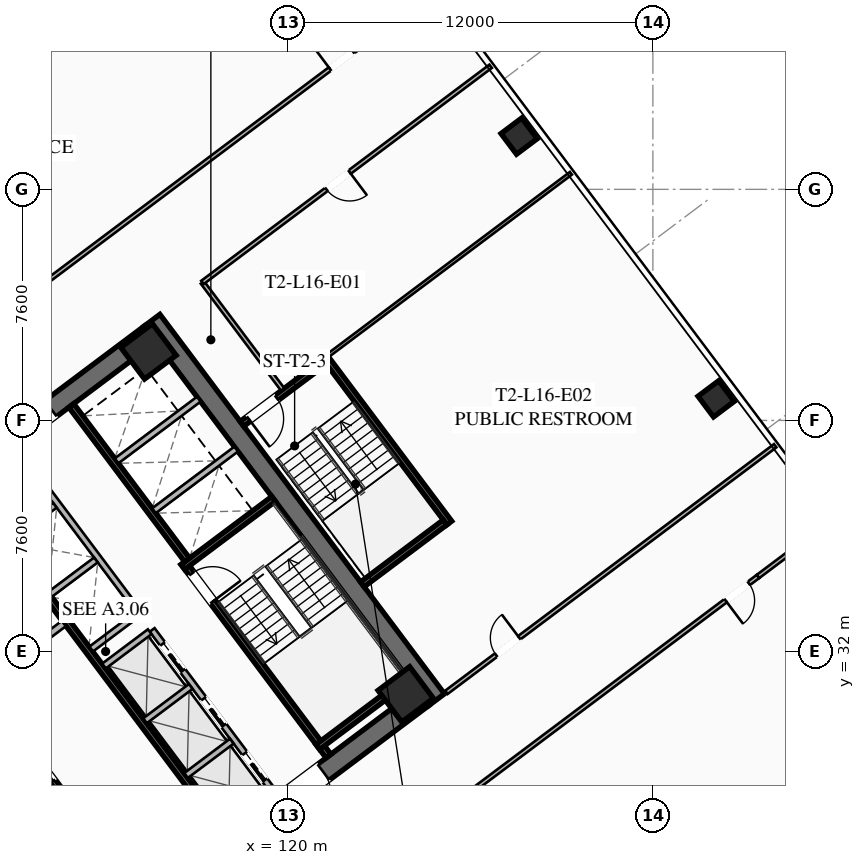
"""IFC4 building model, lengths in metres.
Left out: names, types, materials, properties, quantities, classifications, styles, units other than length and angle.
Written with IfcOpenShell. Run it as: python <this file> out.ifc"""

import sys

from ifc_helpers import new_model, si_unit, direction, frame, frame_2d, origin, origin_2d, place, context, subcontext, project, spatial, rectangle, hollow_rectangle, extrude, element, fill, save


model = new_model("IFC4")
c1 = context("Model", 3, precision=1e-05, world=origin(), true_north=direction((0.0, 1.0)))
c2 = subcontext(c1, "Body", "Model", "MODEL_VIEW")
j1 = project(units=[si_unit("LENGTHUNIT", "METRE"), si_unit("PLANEANGLEUNIT", "RADIAN")], contexts=[c1])
p1 = place(None, origin())
s1 = spatial("IfcSite", under=j1, at=p1, CompositionType="ELEMENT")
p2 = place(p1, origin())
s2 = spatial("IfcBuilding", under=s1, at=p2, CompositionType="ELEMENT")
p3 = place(p2, frame((0.0, 0.0, 63.65)))
s3 = spatial("IfcBuildingStorey", under=s2, at=p3, CompositionType="ELEMENT", Elevation=63.65)
for number, where, z_axis, x_axis in (
    (1, (112.476, 21.107, 0.0), (0.0, 0.0, 1.0), (-0.6, 0.8, 0.0)),
    (2, (115.524, 42.893, 0.0), (0.0, 0.0, 1.0), (0.6, -0.8, 0.0)),
):
    element("IfcWall", number, at=place(p3, frame(where, z_axis=z_axis, x_axis=x_axis)), inside=s3, PredefinedType="SHEAR", context=c2, shape_type="SweptSolid", body=[
        extrude(rectangle(XDim=15.6, YDim=0.65, at=frame_2d((7.8, 0.0))), origin(), (0.0, 0.0, 1.0), 3.55),
    ])
p4 = place(p3, frame((124.429, 30.478, 0.0), z_axis=(0.0, 0.0, 1.0), x_axis=(-0.799998028465, -0.600002628705, 0.0)))
e3 = element("IfcWall", 3, at=p4, inside=s3, PredefinedType="SHEAR", context=c2, shape_type="SweptSolid", body=[
    extrude(rectangle(XDim=14.86, YDim=0.65, at=frame_2d((7.43, 0.0))), origin(), (0.0, 0.0, 1.0), 3.55),
])
p5 = place(p4, frame((9.13, 0.0, 0.0)))
e4 = element("IfcOpeningElement", 4, at=p5, cuts=e3, PredefinedType="OPENING", context=c2, shape_type="SweptSolid", body=[
    extrude(rectangle(XDim=1.25, YDim=2.25, at=frame_2d((0.625, 1.125))), frame((0.0, 0.335, 0.0), z_axis=(0.0, -1.0, 0.0), x_axis=(1.0, 0.0, 0.0)), (0.0, 0.0, 1.0), 0.67),
])
p6 = place(p4, frame((4.08, 0.0, 0.0)))
e5 = element("IfcOpeningElement", 5, at=p6, cuts=e3, PredefinedType="OPENING", context=c2, shape_type="SweptSolid", body=[
    extrude(rectangle(XDim=1.25, YDim=2.25, at=frame_2d((0.625, 1.125))), frame((0.0, 0.335, 0.0), z_axis=(0.0, -1.0, 0.0), x_axis=(1.0, 0.0, 0.0)), (0.0, 0.0, 1.0), 0.67),
])
p7 = place(p3, frame((103.571, 33.522, 0.0), z_axis=(0.0, 0.0, 1.0), x_axis=(0.799998028465, 0.600002628705, 0.0)))
e6 = element("IfcWall", 6, at=p7, inside=s3, PredefinedType="SHEAR", context=c2, shape_type="SweptSolid", body=[
    extrude(rectangle(XDim=14.86, YDim=0.65, at=frame_2d((7.43, 0.0))), origin(), (0.0, 0.0, 1.0), 3.55),
])
p8 = place(p7, frame((4.48, 0.0, 0.0)))
e7 = element("IfcOpeningElement", 7, at=p8, cuts=e6, PredefinedType="OPENING", context=c2, shape_type="SweptSolid", body=[
    extrude(rectangle(XDim=1.25, YDim=2.25, at=frame_2d((0.625, 1.125))), frame((0.0, 0.335, 0.0), z_axis=(0.0, -1.0, 0.0), x_axis=(1.0, 0.0, 0.0)), (0.0, 0.0, 1.0), 0.67),
])
p9 = place(p7, frame((9.53, 0.0, 0.0)))
e8 = element("IfcOpeningElement", 8, at=p9, cuts=e6, PredefinedType="OPENING", context=c2, shape_type="SweptSolid", body=[
    extrude(rectangle(XDim=1.25, YDim=2.25, at=frame_2d((0.625, 1.125))), frame((0.0, 0.335, 0.0), z_axis=(0.0, -1.0, 0.0), x_axis=(1.0, 0.0, 0.0)), (0.0, 0.0, 1.0), 0.67),
])
for number, where, z_axis, x_axis in (
    (9, (123.87, 30.59, 0.0), (0.0, 0.0, 1.0), (0.8, 0.6, 0.0)),
    (10, (115.41, 41.87, 0.0), (0.0, 0.0, 1.0), (0.8, 0.6, 0.0)),
):
    element("IfcColumn", number, at=place(p3, frame(where, z_axis=z_axis, x_axis=x_axis)), inside=s3, PredefinedType="COLUMN", context=c2, shape_type="SweptSolid", body=[
        extrude(hollow_rectangle(XDim=1.3, YDim=1.3, WallThickness=0.05, at=origin_2d()), origin(), (0.0, 0.0, 1.0), 3.35),
    ])
for number, where, z_axis, x_axis in (
    (11, (134.08, 40.31, 0.0), (0.0, 0.0, 1.0), (0.8, 0.6, 0.0)),
    (12, (127.6, 48.95, 0.0), (0.0, 0.0, 1.0), (0.8, 0.6, 0.0)),
):
    element("IfcColumn", number, at=place(p3, frame(where, z_axis=z_axis, x_axis=x_axis)), inside=s3, PredefinedType="COLUMN", context=c2, shape_type="SweptSolid", body=[
        extrude(hollow_rectangle(XDim=0.85, YDim=0.85, WallThickness=0.035, at=origin_2d()), origin(), (0.0, 0.0, 1.0), 3.35),
    ])
p10 = place(p3, frame((116.56, 34.92, 0.0), z_axis=(0.0, 0.0, 1.0), x_axis=(0.600009827119, -0.799992629566, 0.0)))
e13 = element("IfcWall", 13, at=p10, inside=s3, PredefinedType="SHEAR", context=c2, shape_type="SweptSolid", body=[
    extrude(rectangle(XDim=7.95, YDim=0.2, at=frame_2d((3.975, 0.0))), origin(), (0.0, 0.0, 1.0), 3.35),
])
p11 = place(p10, frame((0.45, 0.0, 0.0)))
e14 = element("IfcOpeningElement", 14, at=p11, cuts=e13, PredefinedType="OPENING", context=c2, shape_type="SweptSolid", body=[
    extrude(rectangle(XDim=1.15, YDim=2.2, at=frame_2d((0.575, 1.1))), frame((0.0, 0.11, 0.0), z_axis=(0.0, -1.0, 0.0), x_axis=(1.0, 0.0, 0.0)), (0.0, 0.0, 1.0), 0.22),
])
for number, where, z_axis, x_axis in (
    (15, (116.54, 34.78, 0.0), (0.0, 0.0, 1.0), (0.8, 0.6, 0.0)),
    (16, (120.98, 28.86, 0.0), (0.0, 0.0, 1.0), (0.8, 0.6, 0.0)),
):
    element("IfcWall", number, at=place(p3, frame(where, z_axis=z_axis, x_axis=x_axis)), inside=s3, PredefinedType="SHEAR", context=c2, shape_type="SweptSolid", body=[
        extrude(rectangle(XDim=3.73, YDim=0.2, at=frame_2d((1.865, 0.0))), origin(), (0.0, 0.0, 1.0), 3.35),
    ])
p12 = place(p3, frame((117.938, 26.016, 0.0), z_axis=(0.0, 0.0, 1.0), x_axis=(-0.600005463273, 0.799995902516, 0.0)))
e17 = element("IfcWall", 17, at=p12, inside=s3, PredefinedType="SHEAR", context=c2, shape_type="SweptSolid", body=[
    extrude(rectangle(XDim=14.3, YDim=0.2, at=frame_2d((7.15, 0.0))), origin(), (0.0, 0.0, 1.0), 3.35),
])
p13 = place(p3, frame((110.104, 31.028, 0.0), z_axis=(0.0, 0.0, 1.0), x_axis=(0.800018601094, 0.59997519774, 0.0)))
e18 = element("IfcWall", 18, at=p13, inside=s3, PredefinedType="SOLIDWALL", context=c2, shape_type="SweptSolid", body=[
    extrude(rectangle(XDim=3.15, YDim=0.22, at=frame_2d((1.575, 0.0))), origin(), (0.0, 0.0, 1.0), 2.493),
])
p14 = place(p3, frame((115.13, 23.91, 0.0), z_axis=(0.0, 0.0, 1.0), x_axis=(-0.599975393228, 0.800018454488, 0.0)))
e19 = element("IfcWall", 19, at=p14, inside=s3, PredefinedType="SHEAR", context=c2, shape_type="SweptSolid", body=[
    extrude(rectangle(XDim=6.35, YDim=0.2, at=frame_2d((3.175, 0.0))), origin(), (0.0, 0.0, 1.0), 3.35),
])
p15 = place(p14, frame((4.775, 0.0, 0.0)))
e20 = element("IfcOpeningElement", 20, at=p15, cuts=e19, PredefinedType="OPENING", context=c2, shape_type="SweptSolid", body=[
    extrude(rectangle(XDim=1.3, YDim=2.25, at=frame_2d((0.65, 1.125))), frame((0.0, 0.11, 0.0), z_axis=(0.0, -1.0, 0.0), x_axis=(1.0, 0.0, 0.0)), (0.0, 0.0, 1.0), 0.22),
])
p16 = place(p14, frame((2.775, 0.0, 0.0)))
e21 = element("IfcOpeningElement", 21, at=p16, cuts=e19, PredefinedType="OPENING", context=c2, shape_type="SweptSolid", body=[
    extrude(rectangle(XDim=1.3, YDim=2.25, at=frame_2d((0.65, 1.125))), frame((0.0, 0.11, 0.0), z_axis=(0.0, -1.0, 0.0), x_axis=(1.0, 0.0, 0.0)), (0.0, 0.0, 1.0), 0.22),
])
p17 = place(p14, frame((0.575, 0.0, 0.0)))
e22 = element("IfcOpeningElement", 22, at=p17, cuts=e19, PredefinedType="OPENING", context=c2, shape_type="SweptSolid", body=[
    extrude(rectangle(XDim=1.3, YDim=2.25, at=frame_2d((0.65, 1.125))), frame((0.0, 0.11, 0.0), z_axis=(0.0, -1.0, 0.0), x_axis=(1.0, 0.0, 0.0)), (0.0, 0.0, 1.0), 0.22),
])
p18 = place(p3, frame((112.87, 40.09, 0.0), z_axis=(0.0, 0.0, 1.0), x_axis=(0.599975393228, -0.800018454488, 0.0)))
e23 = element("IfcWall", 23, at=p18, inside=s3, PredefinedType="SHEAR", context=c2, shape_type="SweptSolid", body=[
    extrude(rectangle(XDim=6.35, YDim=0.2, at=frame_2d((3.175, 0.0))), origin(), (0.0, 0.0, 1.0), 3.35),
])
for number, where, z_axis, x_axis in (
    (24, (115.59, 36.63, 0.0), (0.0, 0.0, 1.0), (0.8, 0.6, 0.0)),
    (25, (114.36, 38.27, 0.0), (0.0, 0.0, 1.0), (0.8, 0.6, 0.0)),
):
    element("IfcWall", number, at=place(p3, frame(where, z_axis=z_axis, x_axis=x_axis)), inside=s3, PredefinedType="SOLIDWALL", context=c2, shape_type="SweptSolid", body=[
        extrude(rectangle(XDim=3.38, YDim=0.2, at=frame_2d((1.69, 0.0))), origin(), (0.0, 0.0, 1.0), 3.35),
    ])
p19 = place(p3, frame((119.61, 27.27, 0.0), z_axis=(0.0, 0.0, 1.0), x_axis=(-0.600011488909, 0.79999138319, 0.0)))
e26 = element("IfcWall", 26, at=p19, inside=s3, PredefinedType="SOLIDWALL", context=c2, shape_type="SweptSolid", body=[
    extrude(rectangle(XDim=6.8, YDim=0.2, at=frame_2d((3.4, 0.0))), origin(), (0.0, 0.0, 1.0), 3.35),
])
p20 = place(p19, frame((0.625, 0.0, 0.0)))
e27 = element("IfcOpeningElement", 27, at=p20, cuts=e26, PredefinedType="OPENING", context=c2, shape_type="SweptSolid", body=[
    extrude(rectangle(XDim=1.1, YDim=2.2, at=frame_2d((0.55, 1.1))), frame((0.0, 0.11, 0.0), z_axis=(0.0, -1.0, 0.0), x_axis=(1.0, 0.0, 0.0)), (0.0, 0.0, 1.0), 0.22),
])
p21 = place(p19, frame((2.875, 0.0, 0.0)))
e28 = element("IfcOpeningElement", 28, at=p21, cuts=e26, PredefinedType="OPENING", context=c2, shape_type="SweptSolid", body=[
    extrude(rectangle(XDim=1.1, YDim=2.2, at=frame_2d((0.55, 1.1))), frame((0.0, 0.11, 0.0), z_axis=(0.0, -1.0, 0.0), x_axis=(1.0, 0.0, 0.0)), (0.0, 0.0, 1.0), 0.22),
])
p22 = place(p19, frame((5.125, 0.0, 0.0)))
e29 = element("IfcOpeningElement", 29, at=p22, cuts=e26, PredefinedType="OPENING", context=c2, shape_type="SweptSolid", body=[
    extrude(rectangle(XDim=1.1, YDim=2.2, at=frame_2d((0.55, 1.1))), frame((0.0, 0.11, 0.0), z_axis=(0.0, -1.0, 0.0), x_axis=(1.0, 0.0, 0.0)), (0.0, 0.0, 1.0), 0.22),
])
p23 = place(p3, frame((116.646, 27.922, 0.0), z_axis=(0.0, 0.0, 1.0), x_axis=(0.8, 0.6, 0.0)))
e30 = element("IfcWall", 30, at=p23, inside=s3, PredefinedType="SOLIDWALL", context=c2, shape_type="SweptSolid", body=[
    extrude(rectangle(XDim=1.88, YDim=0.2, at=frame_2d((0.94, 0.0))), origin(), (0.0, 0.0, 1.0), 3.35),
])
p24 = place(p3, frame((115.296, 29.722, 0.0), z_axis=(0.0, 0.0, 1.0), x_axis=(0.799984418148, 0.600020775241, 0.0)))
e31 = element("IfcWall", 31, at=p24, inside=s3, PredefinedType="SOLIDWALL", context=c2, shape_type="SweptSolid", body=[
    extrude(rectangle(XDim=1.88, YDim=0.2, at=frame_2d((0.94, 0.0))), origin(), (0.0, 0.0, 1.0), 3.35),
])
p25 = place(p3, frame((113.946, 31.522, 0.0), z_axis=(0.0, 0.0, 1.0), x_axis=(0.8, 0.6, 0.0)))
e32 = element("IfcWall", 32, at=p25, inside=s3, PredefinedType="SOLIDWALL", context=c2, shape_type="SweptSolid", body=[
    extrude(rectangle(XDim=1.88, YDim=0.2, at=frame_2d((0.94, 0.0))), origin(), (0.0, 0.0, 1.0), 3.35),
])
p26 = place(p3, frame((115.11, 33.27, 0.0), z_axis=(0.0, 0.0, 1.0), x_axis=(-0.600011488909, 0.79999138319, 0.0)))
e33 = element("IfcWall", 33, at=p26, inside=s3, PredefinedType="SOLIDWALL", context=c2, shape_type="SweptSolid", body=[
    extrude(rectangle(XDim=6.8, YDim=0.2, at=frame_2d((3.4, 0.0))), origin(), (0.0, 0.0, 1.0), 3.35),
])
p27 = place(p3, frame((113.526, 32.082, 0.0), z_axis=(0.0, 0.0, 1.0), x_axis=(0.800046745961, 0.599937666993, 0.0)))
e34 = element("IfcWall", 34, at=p27, inside=s3, PredefinedType="SOLIDWALL", context=c2, shape_type="SweptSolid", body=[
    extrude(rectangle(XDim=1.88, YDim=0.2, at=frame_2d((0.94, 0.0))), origin(), (0.0, 0.0, 1.0), 3.35),
])
p28 = place(p3, frame((112.176, 33.882, 0.0), z_axis=(0.0, 0.0, 1.0), x_axis=(0.8, 0.6, 0.0)))
e35 = element("IfcWall", 35, at=p28, inside=s3, PredefinedType="SOLIDWALL", context=c2, shape_type="SweptSolid", body=[
    extrude(rectangle(XDim=1.88, YDim=0.2, at=frame_2d((0.94, 0.0))), origin(), (0.0, 0.0, 1.0), 3.35),
])
p29 = place(p3, frame((110.826, 35.682, 0.0), z_axis=(0.0, 0.0, 1.0), x_axis=(0.799984418148, 0.600020775241, 0.0)))
e36 = element("IfcWall", 36, at=p29, inside=s3, PredefinedType="SOLIDWALL", context=c2, shape_type="SweptSolid", body=[
    extrude(rectangle(XDim=1.88, YDim=0.2, at=frame_2d((0.94, 0.0))), origin(), (0.0, 0.0, 1.0), 3.35),
])
p30 = place(p3, frame((125.304, 36.228, 0.0), z_axis=(0.0, 0.0, 1.0), x_axis=(-0.59998851072, 0.800008616831, 0.0)))
e37 = element("IfcWall", 37, at=p30, inside=s3, PredefinedType="SHEAR", context=c2, shape_type="SweptSolid", body=[
    extrude(rectangle(XDim=6.8, YDim=0.2, at=frame_2d((3.4, 0.0))), origin(), (0.0, 0.0, 1.0), 3.35),
])
p31 = place(p3, frame((121.204, 41.528, 0.0), z_axis=(0.0, 0.0, 1.0), x_axis=(-0.800017232136, -0.599977023131, 0.0)))
e38 = element("IfcWall", 38, at=p31, inside=s3, PredefinedType="SHEAR", context=c2, shape_type="SweptSolid", body=[
    extrude(rectangle(XDim=3.4, YDim=0.2, at=frame_2d((1.7, 0.0))), origin(), (0.0, 0.0, 1.0), 3.35),
])
p32 = place(p31, frame((1.975, 0.0, 0.0)))
e39 = element("IfcOpeningElement", 39, at=p32, cuts=e38, PredefinedType="OPENING", context=c2, shape_type="SweptSolid", body=[
    extrude(rectangle(XDim=1.15, YDim=2.2, at=frame_2d((0.575, 1.1))), frame((0.0, 0.11, 0.0), z_axis=(0.0, -1.0, 0.0), x_axis=(1.0, 0.0, 0.0)), (0.0, 0.0, 1.0), 0.22),
])
p33 = place(p3, frame((122.444, 34.208, 0.0), z_axis=(0.0, 0.0, 1.0), x_axis=(0.79999138319, 0.600011488909, 0.0)))
e40 = element("IfcWall", 40, at=p33, inside=s3, PredefinedType="SHEAR", context=c2, shape_type="SweptSolid", body=[
    extrude(rectangle(XDim=3.4, YDim=0.2, at=frame_2d((1.7, 0.0))), origin(), (0.0, 0.0, 1.0), 3.35),
])
p34 = place(p3, frame((119.824, 40.618, 0.0), z_axis=(0.0, 0.0, 1.0), x_axis=(-0.599982243973, 0.800013316712, 0.0)))
e41 = element("IfcWall", 41, at=p34, inside=s3, PredefinedType="PARTITIONING", context=c2, shape_type="SweptSolid", body=[
    extrude(rectangle(XDim=4.4, YDim=0.135, at=frame_2d((2.2, 0.0))), origin(), (0.0, 0.0, 1.0), 2.493),
])
p35 = place(p3, frame((98.516, 34.012, 0.0), z_axis=(0.0, 0.0, 1.0), x_axis=(0.799998035726, 0.600002619023, 0.0)))
e42 = element("IfcWall", 42, at=p35, inside=s3, PredefinedType="PARTITIONING", context=c2, shape_type="SweptSolid", body=[
    extrude(rectangle(XDim=29.83, YDim=0.135, at=frame_2d((14.915, 0.0))), origin(), (0.0, 0.0, 1.0), 2.493),
])
p36 = place(p35, frame((1.587, 0.0, 0.0)))
e43 = element("IfcOpeningElement", 43, at=p36, cuts=e42, PredefinedType="OPENING", context=c2, shape_type="SweptSolid", body=[
    extrude(rectangle(XDim=0.95, YDim=2.05, at=frame_2d((0.475, 1.025))), frame((0.0, 0.077, 0.0), z_axis=(0.0, -1.0, 0.0), x_axis=(1.0, 0.0, 0.0)), (0.0, 0.0, 1.0), 0.155),
])
p37 = place(p35, frame((28.58, 0.0, 0.0)))
e44 = element("IfcOpeningElement", 44, at=p37, cuts=e42, PredefinedType="OPENING", context=c2, shape_type="SweptSolid", body=[
    extrude(rectangle(XDim=0.95, YDim=2.05, at=frame_2d((0.475, 1.025))), frame((0.0, 0.077, 0.0), z_axis=(0.0, -1.0, 0.0), x_axis=(1.0, 0.0, 0.0)), (0.0, 0.0, 1.0), 0.155),
])
p38 = place(p3, frame((135.46, 34.47, 0.0), z_axis=(0.0, 0.0, 1.0), x_axis=(-0.800000982127, -0.599998690494, 0.0)))
e45 = element("IfcWall", 45, at=p38, inside=s3, PredefinedType="PARTITIONING", context=c2, shape_type="SweptSolid", body=[
    extrude(rectangle(XDim=29.83, YDim=0.135, at=frame_2d((14.915, 0.0))), origin(), (0.0, 0.0, 1.0), 2.493),
])
p39 = place(p38, frame((27.431, 0.0, 0.0)))
e46 = element("IfcOpeningElement", 46, at=p39, cuts=e45, PredefinedType="OPENING", context=c2, shape_type="SweptSolid", body=[
    extrude(rectangle(XDim=0.95, YDim=2.05, at=frame_2d((0.475, 1.025))), frame((0.0, 0.077, 0.0), z_axis=(0.0, -1.0, 0.0), x_axis=(1.0, 0.0, 0.0)), (0.0, 0.0, 1.0), 0.155),
])
p40 = place(p38, frame((18.43, 0.0, 0.0)))
e47 = element("IfcOpeningElement", 47, at=p40, cuts=e45, PredefinedType="OPENING", context=c2, shape_type="SweptSolid", body=[
    extrude(rectangle(XDim=0.95, YDim=2.05, at=frame_2d((0.475, 1.025))), frame((0.0, 0.077, 0.0), z_axis=(0.0, -1.0, 0.0), x_axis=(1.0, 0.0, 0.0)), (0.0, 0.0, 1.0), 0.155),
])
p41 = place(p38, frame((0.38, 0.0, 0.0)))
e48 = element("IfcOpeningElement", 48, at=p41, cuts=e45, PredefinedType="OPENING", context=c2, shape_type="SweptSolid", body=[
    extrude(rectangle(XDim=0.95, YDim=2.05, at=frame_2d((0.475, 1.025))), frame((0.0, 0.077, 0.0), z_axis=(0.0, -1.0, 0.0), x_axis=(1.0, 0.0, 0.0)), (0.0, 0.0, 1.0), 0.155),
])
p42 = place(p3, frame((135.46, 34.47, 0.0), z_axis=(0.0, 0.0, 1.0), x_axis=(0.799990331366, 0.600012891296, 0.0)))
e49 = element("IfcWall", 49, at=p42, inside=s3, PredefinedType="PARTITIONING", context=c2, shape_type="SweptSolid", body=[
    extrude(rectangle(XDim=3.03, YDim=0.135, at=frame_2d((1.515, 0.0))), origin(), (0.0, 0.0, 1.0), 2.493),
])
p43 = place(p3, frame((126.664, 51.248, 0.0), z_axis=(0.0, 0.0, 1.0), x_axis=(-0.799995055373, -0.600006592779, 0.0)))
e50 = element("IfcWall", 50, at=p43, inside=s3, PredefinedType="PARTITIONING", context=c2, shape_type="SweptSolid", body=[
    extrude(rectangle(XDim=11.85, YDim=0.135, at=frame_2d((5.925, 0.0))), origin(), (0.0, 0.0, 1.0), 2.493),
])
p44 = place(p43, frame((5.8, 0.0, 0.0)))
e51 = element("IfcOpeningElement", 51, at=p44, cuts=e50, PredefinedType="OPENING", context=c2, shape_type="SweptSolid", body=[
    extrude(rectangle(XDim=0.95, YDim=2.05, at=frame_2d((0.475, 1.025))), frame((0.0, 0.077, 0.0), z_axis=(0.0, -1.0, 0.0), x_axis=(1.0, 0.0, 0.0)), (0.0, 0.0, 1.0), 0.155),
])
p45 = place(p3, frame((125.208, 30.656, 0.0), z_axis=(0.0, 0.0, 1.0), x_axis=(0.799995666112, 0.600005778473, 0.0)))
e52 = element("IfcWall", 52, at=p45, inside=s3, PredefinedType="PARTITIONING", context=c2, shape_type="SweptSolid", body=[
    extrude(rectangle(XDim=13.52, YDim=0.135, at=frame_2d((6.76, 0.0))), origin(), (0.0, 0.0, 1.0), 2.493),
])
p46 = place(p45, frame((2.045, 0.0, 0.0)))
e53 = element("IfcOpeningElement", 53, at=p46, cuts=e52, PredefinedType="OPENING", context=c2, shape_type="SweptSolid", body=[
    extrude(rectangle(XDim=0.95, YDim=2.05, at=frame_2d((0.475, 1.025))), frame((0.0, 0.077, 0.0), z_axis=(0.0, -1.0, 0.0), x_axis=(1.0, 0.0, 0.0)), (0.0, 0.0, 1.0), 0.155),
])
p47 = place(p3, frame((129.304, 47.728, 0.0), z_axis=(0.0, 0.0, 1.0), x_axis=(-0.8, -0.6, 0.0)))
e54 = element("IfcWall", 54, at=p47, inside=s3, PredefinedType="PARTITIONING", context=c2, shape_type="SweptSolid", body=[
    extrude(rectangle(XDim=10.0, YDim=0.11, at=frame_2d((5.0, 0.0))), origin(), (0.0, 0.0, 1.0), 2.493),
])
p48 = place(p6, origin())
e55 = element("IfcDoor", 55, at=p48, inside=s3, OperationType="SINGLE_SWING_RIGHT", PredefinedType="DOOR", context=c2, shape_type="SweptSolid", body=[
    extrude(rectangle(XDim=1.25, YDim=2.25, at=frame_2d((0.625, 1.125))), frame((0.0, 0.025, 0.0), z_axis=(0.0, -1.0, 0.0), x_axis=(1.0, 0.0, 0.0)), (0.0, 0.0, 1.0), 0.05),
])
fill(e5, e55)
p49 = place(p11, origin())
e56 = element("IfcDoor", 56, at=p49, inside=s3, OperationType="SINGLE_SWING_RIGHT", PredefinedType="DOOR", context=c2, shape_type="SweptSolid", body=[
    extrude(rectangle(XDim=1.15, YDim=2.2, at=frame_2d((0.575, 1.1))), frame((0.0, 0.025, 0.0), z_axis=(0.0, -1.0, 0.0), x_axis=(1.0, 0.0, 0.0)), (0.0, 0.0, 1.0), 0.05),
])
fill(e14, e56)
p50 = place(p32, origin())
e57 = element("IfcDoor", 57, at=p50, inside=s3, OperationType="SINGLE_SWING_RIGHT", PredefinedType="DOOR", context=c2, shape_type="SweptSolid", body=[
    extrude(rectangle(XDim=1.15, YDim=2.2, at=frame_2d((0.575, 1.1))), frame((0.0, 0.025, 0.0), z_axis=(0.0, -1.0, 0.0), x_axis=(1.0, 0.0, 0.0)), (0.0, 0.0, 1.0), 0.05),
])
fill(e39, e57)
p51 = place(p37, origin())
e58 = element("IfcDoor", 58, at=p51, inside=s3, OperationType="SINGLE_SWING_LEFT", PredefinedType="DOOR", context=c2, shape_type="SweptSolid", body=[
    extrude(rectangle(XDim=0.95, YDim=2.05, at=frame_2d((0.475, 1.025))), frame((0.0, 0.025, 0.0), z_axis=(0.0, -1.0, 0.0), x_axis=(1.0, 0.0, 0.0)), (0.0, 0.0, 1.0), 0.05),
])
fill(e44, e58)
p52 = place(p41, origin())
e59 = element("IfcDoor", 59, at=p52, inside=s3, OperationType="SINGLE_SWING_RIGHT", PredefinedType="DOOR", context=c2, shape_type="SweptSolid", body=[
    extrude(rectangle(XDim=0.95, YDim=2.05, at=frame_2d((0.475, 1.025))), frame((0.0, 0.025, 0.0), z_axis=(0.0, -1.0, 0.0), x_axis=(1.0, 0.0, 0.0)), (0.0, 0.0, 1.0), 0.05),
])
fill(e48, e59)
p53 = place(p44, origin())
e60 = element("IfcDoor", 60, at=p53, inside=s3, OperationType="SINGLE_SWING_LEFT", PredefinedType="DOOR", context=c2, shape_type="SweptSolid", body=[
    extrude(rectangle(XDim=0.95, YDim=2.05, at=frame_2d((0.475, 1.025))), frame((0.0, 0.025, 0.0), z_axis=(0.0, -1.0, 0.0), x_axis=(1.0, 0.0, 0.0)), (0.0, 0.0, 1.0), 0.05),
])
fill(e51, e60)
p54 = place(p46, origin())
e61 = element("IfcDoor", 61, at=p54, inside=s3, OperationType="SINGLE_SWING_RIGHT", PredefinedType="DOOR", context=c2, shape_type="SweptSolid", body=[
    extrude(rectangle(XDim=0.95, YDim=2.05, at=frame_2d((0.475, 1.025))), frame((0.0, 0.025, 0.0), z_axis=(0.0, -1.0, 0.0), x_axis=(1.0, 0.0, 0.0)), (0.0, 0.0, 1.0), 0.05),
])
fill(e53, e61)
p55 = place(p15, origin())
e62 = element("IfcDoor", 62, at=p55, inside=s3, OperationType="SLIDING_TO_LEFT", PredefinedType="DOOR", context=c2, shape_type="SweptSolid", body=[
    extrude(rectangle(XDim=1.3, YDim=2.25, at=frame_2d((0.65, 1.125))), frame((0.0, 0.025, 0.0), z_axis=(0.0, -1.0, 0.0), x_axis=(1.0, 0.0, 0.0)), (0.0, 0.0, 1.0), 0.05),
])
fill(e20, e62)
p56 = place(p20, origin())
e63 = element("IfcDoor", 63, at=p56, inside=s3, OperationType="SLIDING_TO_LEFT", PredefinedType="DOOR", context=c2, shape_type="SweptSolid", body=[
    extrude(rectangle(XDim=1.1, YDim=2.2, at=frame_2d((0.55, 1.1))), frame((0.0, 0.025, 0.0), z_axis=(0.0, -1.0, 0.0), x_axis=(1.0, 0.0, 0.0)), (0.0, 0.0, 1.0), 0.05),
])
fill(e27, e63)
p57 = place(p21, origin())
e64 = element("IfcDoor", 64, at=p57, inside=s3, OperationType="SLIDING_TO_LEFT", PredefinedType="DOOR", context=c2, shape_type="SweptSolid", body=[
    extrude(rectangle(XDim=1.1, YDim=2.2, at=frame_2d((0.55, 1.1))), frame((0.0, 0.025, 0.0), z_axis=(0.0, -1.0, 0.0), x_axis=(1.0, 0.0, 0.0)), (0.0, 0.0, 1.0), 0.05),
])
fill(e28, e64)
p58 = place(p22, origin())
e65 = element("IfcDoor", 65, at=p58, inside=s3, OperationType="SLIDING_TO_LEFT", PredefinedType="DOOR", context=c2, shape_type="SweptSolid", body=[
    extrude(rectangle(XDim=1.1, YDim=2.2, at=frame_2d((0.55, 1.1))), frame((0.0, 0.025, 0.0), z_axis=(0.0, -1.0, 0.0), x_axis=(1.0, 0.0, 0.0)), (0.0, 0.0, 1.0), 0.05),
])
fill(e29, e65)
save(model, sys.argv[1])
